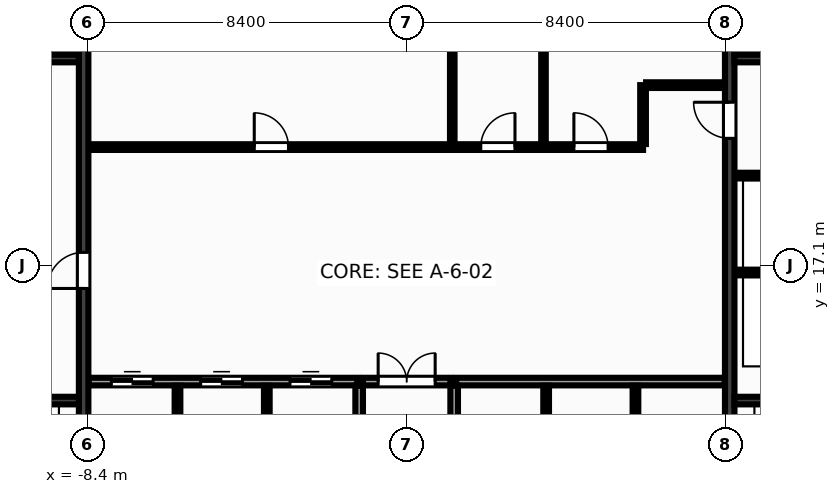
"""IFC4 building model, lengths in metres.
Left out: names, types, materials, properties, quantities, classifications, styles, units other than length and angle.
Written with IfcOpenShell. Run it as: python <this file> out.ifc"""

import sys

from ifc_helpers import new_model, si_unit, direction, frame, frame_2d, origin, place, context, subcontext, project, spatial, rectangle, extrude, source, transform, mapped, element, fill, save


model = new_model("IFC4")
c1 = context("Model", 3, precision=1e-05, world=origin(), true_north=direction((0.0, 1.0)))
c2 = subcontext(c1, "Body", "Model", "MODEL_VIEW")
j1 = project(units=[si_unit("LENGTHUNIT", "METRE"), si_unit("PLANEANGLEUNIT", "RADIAN")], contexts=[c1])
p1 = place(None, origin())
s1 = spatial("IfcSite", under=j1, at=p1, CompositionType="ELEMENT")
p2 = place(p1, origin())
s2 = spatial("IfcBuilding", under=s1, at=p2, CompositionType="ELEMENT")
p3 = place(p2, frame((0.0, 0.0, 14.3)))
s3 = spatial("IfcBuildingStorey", under=s2, at=p3, CompositionType="ELEMENT", Elevation=14.3)
m1 = source(origin(), c2, "Body", "SweptSolid", [
    extrude(rectangle(XDim=12.8, YDim=0.25, at=frame_2d((6.4, 0.0))), origin(), (0.0, 0.0, 1.0), 4.65),
])
p4 = place(p3, frame((-8.5, 10.6, 0.0), z_axis=(0.0, 0.0, 1.0), x_axis=(0.0, 1.0, 0.0)))
e1 = element("IfcWall", 1, at=p4, inside=s3, PredefinedType="SHEAR", context=c2, shape_type="MappedRepresentation", body=[
    mapped(m1, transform((0.0, 0.0, 0.0), x_axis=(1.0, 0.0, 0.0), y_axis=(0.0, 1.0, 0.0), z_axis=(0.0, 0.0, 1.0), scale=1.0)),
])
p5 = place(p4, frame((5.9, 0.0, 0.0)))
e2 = element("IfcOpeningElement", 2, at=p5, cuts=e1, PredefinedType="OPENING", context=c2, shape_type="SweptSolid", body=[
    extrude(rectangle(XDim=0.95, YDim=2.15, at=frame_2d((0.475, 1.075))), frame((0.0, 0.137, 0.0), z_axis=(0.0, -1.0, 0.0), x_axis=(1.0, 0.0, 0.0)), (0.0, 0.0, 1.0), 0.274),
])
p6 = place(p3, frame((8.5, 10.6, 0.0), z_axis=(0.0, 0.0, 1.0), x_axis=(0.0, 1.0, 0.0)))
e3 = element("IfcWall", 3, at=p6, inside=s3, PredefinedType="SHEAR", context=c2, shape_type="MappedRepresentation", body=[
    mapped(m1, transform((0.0, 0.0, 0.0), x_axis=(1.0, 0.0, 0.0), y_axis=(0.0, 1.0, 0.0), z_axis=(0.0, 0.0, 1.0), scale=1.0)),
])
p7 = place(p6, frame((9.85, 0.0, 0.0)))
e4 = element("IfcOpeningElement", 4, at=p7, cuts=e3, PredefinedType="OPENING", context=c2, shape_type="SweptSolid", body=[
    extrude(rectangle(XDim=0.95, YDim=2.15, at=frame_2d((0.475, 1.075))), frame((0.0, 0.137, 0.0), z_axis=(0.0, -1.0, 0.0), x_axis=(1.0, 0.0, 0.0)), (0.0, 0.0, 1.0), 0.274),
])
m2 = source(origin(), c2, "Body", "SweptSolid", [
    extrude(rectangle(XDim=2.825, YDim=0.2, at=frame_2d((1.413, 0.0))), origin(), (0.0, 0.0, 1.0), 4.65),
])
for number, where, z_axis, x_axis in (
    (5, (-11.45, 13.55, 0.0), (0.0, 0.0, 1.0), (1.0, 0.0, 0.0)),
    (6, (8.625, 13.55, 0.0), (0.0, 0.0, 1.0), (1.0, 0.0, 0.0)),
):
    element("IfcWall", number, at=place(p3, frame(where, z_axis=z_axis, x_axis=x_axis)), inside=s3, PredefinedType="SHEAR", context=c2, shape_type="MappedRepresentation", body=[
        mapped(m2, transform((0.0, 0.0, 0.0), x_axis=(1.0, 0.0, 0.0), y_axis=(0.0, 1.0, 0.0), z_axis=(0.0, 0.0, 1.0), scale=1.0)),
    ])
m3 = source(origin(), c2, "Body", "SweptSolid", [
    extrude(rectangle(XDim=3.02, YDim=0.2, at=frame_2d((1.51, 0.0))), origin(), (0.0, 0.0, 1.0), 4.65),
])
for number, where, z_axis, x_axis in (
    (7, (-11.645, 22.55, 0.0), (0.0, 0.0, 1.0), (1.0, 0.0, 0.0)),
    (8, (8.625, 22.55, 0.0), (0.0, 0.0, 1.0), (1.0, 0.0, 0.0)),
):
    element("IfcWall", number, at=place(p3, frame(where, z_axis=z_axis, x_axis=x_axis)), inside=s3, PredefinedType="SHEAR", context=c2, shape_type="MappedRepresentation", body=[
        mapped(m3, transform((0.0, 0.0, 0.0), x_axis=(1.0, 0.0, 0.0), y_axis=(0.0, 1.0, 0.0), z_axis=(0.0, 0.0, 1.0), scale=1.0)),
    ])
m4 = source(origin(), c2, "Body", "SweptSolid", [
    extrude(rectangle(XDim=3.01, YDim=0.15, at=frame_2d((1.505, 0.0))), origin(), (0.0, 0.0, 1.0), 4.33),
])
for number, where, z_axis, x_axis in (
    (9, (8.63, 16.92, 0.0), (0.0, 0.0, 1.0), (1.0, 0.0, 0.0)),
    (10, (8.63, 19.47, 0.0), (0.0, 0.0, 1.0), (1.0, 0.0, 0.0)),
):
    element("IfcWall", number, at=place(p3, frame(where, z_axis=z_axis, x_axis=x_axis)), inside=s3, PredefinedType="PARTITIONING", context=c2, shape_type="MappedRepresentation", body=[
        mapped(m4, transform((0.0, 0.0, 0.0), x_axis=(1.0, 0.0, 0.0), y_axis=(0.0, 1.0, 0.0), z_axis=(0.0, 0.0, 1.0), scale=1.0)),
    ])
m5 = source(origin(), c2, "Body", "SweptSolid", [
    extrude(rectangle(XDim=7.07, YDim=0.2, at=frame_2d((3.535, 0.0))), origin(), (0.0, 0.0, 1.0), 4.33),
])
p8 = place(p3, frame((-8.37, 14.05, 0.0), z_axis=(0.0, 0.0, 1.0), x_axis=(1.0, 0.0, 0.0)))
e11 = element("IfcWall", 11, at=p8, inside=s3, PredefinedType="PARTITIONING", context=c2, shape_type="MappedRepresentation", body=[
    mapped(m5, transform((0.0, 0.0, 0.0), x_axis=(1.0, 0.0, 0.0), y_axis=(0.0, 1.0, 0.0), z_axis=(0.0, 0.0, 1.0), scale=1.0)),
])
p9 = place(p8, frame((0.6, 0.0, 0.0)))
e12 = element("IfcOpeningElement", 12, at=p9, cuts=e11, PredefinedType="OPENING", context=c2, shape_type="SweptSolid", body=[
    extrude(rectangle(XDim=1.1, YDim=2.15, at=frame_2d((0.55, 1.075))), frame((0.0, 0.112, 0.0), z_axis=(0.0, -1.0, 0.0), x_axis=(1.0, 0.0, 0.0)), (0.0, 0.0, 1.0), 0.224),
])
p10 = place(p8, frame((2.95, 0.0, 0.0)))
e13 = element("IfcOpeningElement", 13, at=p10, cuts=e11, PredefinedType="OPENING", context=c2, shape_type="SweptSolid", body=[
    extrude(rectangle(XDim=1.1, YDim=2.15, at=frame_2d((0.55, 1.075))), frame((0.0, 0.112, 0.0), z_axis=(0.0, -1.0, 0.0), x_axis=(1.0, 0.0, 0.0)), (0.0, 0.0, 1.0), 0.224),
])
p11 = place(p8, frame((5.3, 0.0, 0.0)))
e14 = element("IfcOpeningElement", 14, at=p11, cuts=e11, PredefinedType="OPENING", context=c2, shape_type="SweptSolid", body=[
    extrude(rectangle(XDim=1.1, YDim=2.15, at=frame_2d((0.55, 1.075))), frame((0.0, 0.112, 0.0), z_axis=(0.0, -1.0, 0.0), x_axis=(1.0, 0.0, 0.0)), (0.0, 0.0, 1.0), 0.224),
])
p12 = place(p3, frame((1.3, 14.05, 0.0), z_axis=(0.0, 0.0, 1.0), x_axis=(1.0, 0.0, 0.0)))
e15 = element("IfcWall", 15, at=p12, inside=s3, PredefinedType="PARTITIONING", context=c2, shape_type="MappedRepresentation", body=[
    mapped(m5, transform((0.0, 0.0, 0.0), x_axis=(1.0, 0.0, 0.0), y_axis=(0.0, 1.0, 0.0), z_axis=(0.0, 0.0, 1.0), scale=1.0)),
])
m6 = source(origin(), c2, "Body", "SweptSolid", [
    extrude(rectangle(XDim=3.34, YDim=0.2, at=frame_2d((1.67, 0.0))), origin(), (0.0, 0.0, 1.0), 4.33),
])
for number, where, z_axis, x_axis in (
    (16, (-1.25, 10.6, 0.0), (0.0, 0.0, 1.0), (0.0, 1.0, 0.0)),
    (17, (1.25, 10.6, 0.0), (0.0, 0.0, 1.0), (0.0, 1.0, 0.0)),
):
    element("IfcWall", number, at=place(p3, frame(where, z_axis=z_axis, x_axis=x_axis)), inside=s3, PredefinedType="PARTITIONING", context=c2, shape_type="MappedRepresentation", body=[
        mapped(m6, transform((0.0, 0.0, 0.0), x_axis=(1.0, 0.0, 0.0), y_axis=(0.0, 1.0, 0.0), z_axis=(0.0, 0.0, 1.0), scale=1.0)),
    ])
m7 = source(origin(), c2, "Body", "SweptSolid", [
    extrude(rectangle(XDim=2.3, YDim=0.2, at=frame_2d((1.15, 0.0))), origin(), (0.0, 0.0, 1.0), 4.33),
])
p13 = place(p3, frame((-1.15, 14.05, 0.0), z_axis=(0.0, 0.0, 1.0), x_axis=(1.0, 0.0, 0.0)))
e18 = element("IfcWall", 18, at=p13, inside=s3, PredefinedType="PARTITIONING", context=c2, shape_type="MappedRepresentation", body=[
    mapped(m7, transform((0.0, 0.0, 0.0), x_axis=(1.0, 0.0, 0.0), y_axis=(0.0, 1.0, 0.0), z_axis=(0.0, 0.0, 1.0), scale=1.0)),
])
p14 = place(p13, frame((0.4, 0.0, 0.0)))
e19 = element("IfcOpeningElement", 19, at=p14, cuts=e18, PredefinedType="OPENING", context=c2, shape_type="SweptSolid", body=[
    extrude(rectangle(XDim=1.5, YDim=2.2, at=frame_2d((0.75, 1.1))), frame((0.0, 0.112, 0.0), z_axis=(0.0, -1.0, 0.0), x_axis=(1.0, 0.0, 0.0)), (0.0, 0.0, 1.0), 0.224),
])
m8 = source(origin(), c2, "Body", "SweptSolid", [
    extrude(rectangle(XDim=14.59, YDim=0.15, at=frame_2d((7.295, 0.0))), origin(), (0.0, 0.0, 1.0), 4.33),
])
p15 = place(p3, frame((-8.37, 20.22, 0.0), z_axis=(0.0, 0.0, 1.0), x_axis=(1.0, 0.0, 0.0)))
e20 = element("IfcWall", 20, at=p15, inside=s3, PredefinedType="PARTITIONING", context=c2, shape_type="MappedRepresentation", body=[
    mapped(m8, transform((0.0, 0.0, 0.0), x_axis=(1.0, 0.0, 0.0), y_axis=(0.0, 1.0, 0.0), z_axis=(0.0, 0.0, 1.0), scale=1.0)),
])
p16 = place(p15, frame((4.36, 0.0, 0.0)))
e21 = element("IfcOpeningElement", 21, at=p16, cuts=e20, PredefinedType="OPENING", context=c2, shape_type="SweptSolid", body=[
    extrude(rectangle(XDim=0.9, YDim=2.15, at=frame_2d((0.45, 1.075))), frame((0.0, 0.087, 0.0), z_axis=(0.0, -1.0, 0.0), x_axis=(1.0, 0.0, 0.0)), (0.0, 0.0, 1.0), 0.174),
])
p17 = place(p15, frame((10.32, 0.0, 0.0)))
e22 = element("IfcOpeningElement", 22, at=p17, cuts=e20, PredefinedType="OPENING", context=c2, shape_type="SweptSolid", body=[
    extrude(rectangle(XDim=0.9, YDim=2.15, at=frame_2d((0.45, 1.075))), frame((0.0, 0.087, 0.0), z_axis=(0.0, -1.0, 0.0), x_axis=(1.0, 0.0, 0.0)), (0.0, 0.0, 1.0), 0.174),
])
p18 = place(p15, frame((12.77, 0.0, 0.0)))
e23 = element("IfcOpeningElement", 23, at=p18, cuts=e20, PredefinedType="OPENING", context=c2, shape_type="SweptSolid", body=[
    extrude(rectangle(XDim=0.9, YDim=2.15, at=frame_2d((0.45, 1.075))), frame((0.0, 0.087, 0.0), z_axis=(0.0, -1.0, 0.0), x_axis=(1.0, 0.0, 0.0)), (0.0, 0.0, 1.0), 0.174),
])
m9 = source(origin(), c2, "Body", "SweptSolid", [
    extrude(rectangle(XDim=1.55, YDim=0.15, at=frame_2d((0.775, 0.0))), origin(), (0.0, 0.0, 1.0), 4.33),
])
p19 = place(p3, frame((6.22, 20.3, 0.0), z_axis=(0.0, 0.0, 1.0), x_axis=(0.0, 1.0, 0.0)))
e24 = element("IfcWall", 24, at=p19, inside=s3, PredefinedType="PARTITIONING", context=c2, shape_type="MappedRepresentation", body=[
    mapped(m9, transform((0.0, 0.0, 0.0), x_axis=(1.0, 0.0, 0.0), y_axis=(0.0, 1.0, 0.0), z_axis=(0.0, 0.0, 1.0), scale=1.0)),
])
m10 = source(origin(), c2, "Body", "SweptSolid", [
    extrude(rectangle(XDim=2.07, YDim=0.15, at=frame_2d((1.035, 0.0))), origin(), (0.0, 0.0, 1.0), 4.33),
])
p20 = place(p3, frame((6.3, 21.85, 0.0), z_axis=(0.0, 0.0, 1.0), x_axis=(1.0, 0.0, 0.0)))
e25 = element("IfcWall", 25, at=p20, inside=s3, PredefinedType="PARTITIONING", context=c2, shape_type="MappedRepresentation", body=[
    mapped(m10, transform((0.0, 0.0, 0.0), x_axis=(1.0, 0.0, 0.0), y_axis=(0.0, 1.0, 0.0), z_axis=(0.0, 0.0, 1.0), scale=1.0)),
])
m11 = source(origin(), c2, "Body", "SweptSolid", [
    extrude(rectangle(XDim=3.34, YDim=0.15, at=frame_2d((1.67, 0.0))), origin(), (0.0, 0.0, 1.0), 4.33),
])
for number, where, z_axis, x_axis in (
    (26, (-6.03, 10.6, 0.0), (0.0, 0.0, 1.0), (0.0, 1.0, 0.0)),
    (27, (-3.68, 10.6, 0.0), (0.0, 0.0, 1.0), (0.0, 1.0, 0.0)),
    (28, (3.67, 10.6, 0.0), (0.0, 0.0, 1.0), (0.0, 1.0, 0.0)),
    (29, (6.02, 10.6, 0.0), (0.0, 0.0, 1.0), (0.0, 1.0, 0.0)),
):
    element("IfcWall", number, at=place(p3, frame(where, z_axis=z_axis, x_axis=x_axis)), inside=s3, PredefinedType="PARTITIONING", context=c2, shape_type="MappedRepresentation", body=[
        mapped(m11, transform((0.0, 0.0, 0.0), x_axis=(1.0, 0.0, 0.0), y_axis=(0.0, 1.0, 0.0), z_axis=(0.0, 0.0, 1.0), scale=1.0)),
    ])
m12 = source(origin(), c2, "Body", "SweptSolid", [
    extrude(rectangle(XDim=3.04, YDim=0.12, at=frame_2d((1.52, 0.0))), origin(), (0.0, 0.0, 1.0), 4.33),
])
for number, where, z_axis, x_axis in (
    (30, (1.2, 20.32, 0.0), (0.0, 0.0, 1.0), (0.0, 1.0, 0.0)),
    (31, (3.6, 20.32, 0.0), (0.0, 0.0, 1.0), (0.0, 1.0, 0.0)),
):
    element("IfcWall", number, at=place(p3, frame(where, z_axis=z_axis, x_axis=x_axis)), inside=s3, PredefinedType="PARTITIONING", context=c2, shape_type="MappedRepresentation", body=[
        mapped(m12, transform((0.0, 0.0, 0.0), x_axis=(1.0, 0.0, 0.0), y_axis=(0.0, 1.0, 0.0), z_axis=(0.0, 0.0, 1.0), scale=1.0)),
    ])
m13 = source(origin(), c2, "Body", "SweptSolid", [
    extrude(rectangle(XDim=0.95, YDim=2.15, at=frame_2d((0.475, 1.075))), frame((0.0, 0.025, 0.0), z_axis=(0.0, -1.0, 0.0), x_axis=(1.0, 0.0, 0.0)), (0.0, 0.0, 1.0), 0.05),
])
p21 = place(p5, origin())
e32 = element("IfcDoor", 32, at=p21, inside=s3, OperationType="SINGLE_SWING_LEFT", PredefinedType="DOOR", context=c2, shape_type="MappedRepresentation", body=[
    mapped(m13, transform((0.0, 0.0, 0.0), x_axis=(1.0, 0.0, 0.0), y_axis=(0.0, 1.0, 0.0), z_axis=(0.0, 0.0, 1.0), scale=1.0)),
])
fill(e2, e32)
m14 = source(origin(), c2, "Body", "SweptSolid", [
    extrude(rectangle(XDim=0.95, YDim=2.15, at=frame_2d((0.475, 1.075))), frame((0.0, 0.025, 0.0), z_axis=(0.0, -1.0, 0.0), x_axis=(1.0, 0.0, 0.0)), (0.0, 0.0, 1.0), 0.05),
])
p22 = place(p7, origin())
e33 = element("IfcDoor", 33, at=p22, inside=s3, OperationType="SINGLE_SWING_RIGHT", PredefinedType="DOOR", context=c2, shape_type="MappedRepresentation", body=[
    mapped(m14, transform((0.0, 0.0, 0.0), x_axis=(1.0, 0.0, 0.0), y_axis=(0.0, 1.0, 0.0), z_axis=(0.0, 0.0, 1.0), scale=1.0)),
])
fill(e4, e33)
m15 = source(origin(), c2, "Body", "SweptSolid", [
    extrude(rectangle(XDim=1.1, YDim=2.15, at=frame_2d((0.55, 1.075))), frame((0.0, 0.025, 0.0), z_axis=(0.0, -1.0, 0.0), x_axis=(1.0, 0.0, 0.0)), (0.0, 0.0, 1.0), 0.05),
])
p23 = place(p9, origin())
e34 = element("IfcDoor", 34, at=p23, inside=s3, OperationType="DOUBLE_DOOR_SLIDING", PredefinedType="DOOR", context=c2, shape_type="MappedRepresentation", body=[
    mapped(m15, transform((0.0, 0.0, 0.0), x_axis=(1.0, 0.0, 0.0), y_axis=(0.0, 1.0, 0.0), z_axis=(0.0, 0.0, 1.0), scale=1.0)),
])
fill(e12, e34)
p24 = place(p10, origin())
e35 = element("IfcDoor", 35, at=p24, inside=s3, OperationType="DOUBLE_DOOR_SLIDING", PredefinedType="DOOR", context=c2, shape_type="MappedRepresentation", body=[
    mapped(m15, transform((0.0, 0.0, 0.0), x_axis=(1.0, 0.0, 0.0), y_axis=(0.0, 1.0, 0.0), z_axis=(0.0, 0.0, 1.0), scale=1.0)),
])
fill(e13, e35)
p25 = place(p11, origin())
e36 = element("IfcDoor", 36, at=p25, inside=s3, OperationType="DOUBLE_DOOR_SLIDING", PredefinedType="DOOR", context=c2, shape_type="MappedRepresentation", body=[
    mapped(m15, transform((0.0, 0.0, 0.0), x_axis=(1.0, 0.0, 0.0), y_axis=(0.0, 1.0, 0.0), z_axis=(0.0, 0.0, 1.0), scale=1.0)),
])
fill(e14, e36)
m16 = source(origin(), c2, "Body", "SweptSolid", [
    extrude(rectangle(XDim=1.5, YDim=2.2, at=frame_2d((0.75, 1.1))), frame((0.0, 0.025, 0.0), z_axis=(0.0, -1.0, 0.0), x_axis=(1.0, 0.0, 0.0)), (0.0, 0.0, 1.0), 0.05),
])
p26 = place(p14, origin())
e37 = element("IfcDoor", 37, at=p26, inside=s3, OperationType="DOUBLE_DOOR_SINGLE_SWING", PredefinedType="DOOR", context=c2, shape_type="MappedRepresentation", body=[
    mapped(m16, transform((0.0, 0.0, 0.0), x_axis=(1.0, 0.0, 0.0), y_axis=(0.0, 1.0, 0.0), z_axis=(0.0, 0.0, 1.0), scale=1.0)),
])
fill(e19, e37)
m17 = source(origin(), c2, "Body", "SweptSolid", [
    extrude(rectangle(XDim=0.9, YDim=2.15, at=frame_2d((0.45, 1.075))), frame((0.0, 0.025, 0.0), z_axis=(0.0, -1.0, 0.0), x_axis=(1.0, 0.0, 0.0)), (0.0, 0.0, 1.0), 0.05),
])
p27 = place(p16, origin())
e38 = element("IfcDoor", 38, at=p27, inside=s3, OperationType="SINGLE_SWING_LEFT", PredefinedType="DOOR", context=c2, shape_type="MappedRepresentation", body=[
    mapped(m17, transform((0.0, 0.0, 0.0), x_axis=(1.0, 0.0, 0.0), y_axis=(0.0, 1.0, 0.0), z_axis=(0.0, 0.0, 1.0), scale=1.0)),
])
fill(e21, e38)
p28 = place(p17, origin())
e39 = element("IfcDoor", 39, at=p28, inside=s3, OperationType="SINGLE_SWING_RIGHT", PredefinedType="DOOR", context=c2, shape_type="MappedRepresentation", body=[
    mapped(m17, transform((0.0, 0.0, 0.0), x_axis=(1.0, 0.0, 0.0), y_axis=(0.0, 1.0, 0.0), z_axis=(0.0, 0.0, 1.0), scale=1.0)),
])
fill(e22, e39)
p29 = place(p18, origin())
e40 = element("IfcDoor", 40, at=p29, inside=s3, OperationType="SINGLE_SWING_LEFT", PredefinedType="DOOR", context=c2, shape_type="MappedRepresentation", body=[
    mapped(m17, transform((0.0, 0.0, 0.0), x_axis=(1.0, 0.0, 0.0), y_axis=(0.0, 1.0, 0.0), z_axis=(0.0, 0.0, 1.0), scale=1.0)),
])
fill(e23, e40)
save(model, sys.argv[1])
